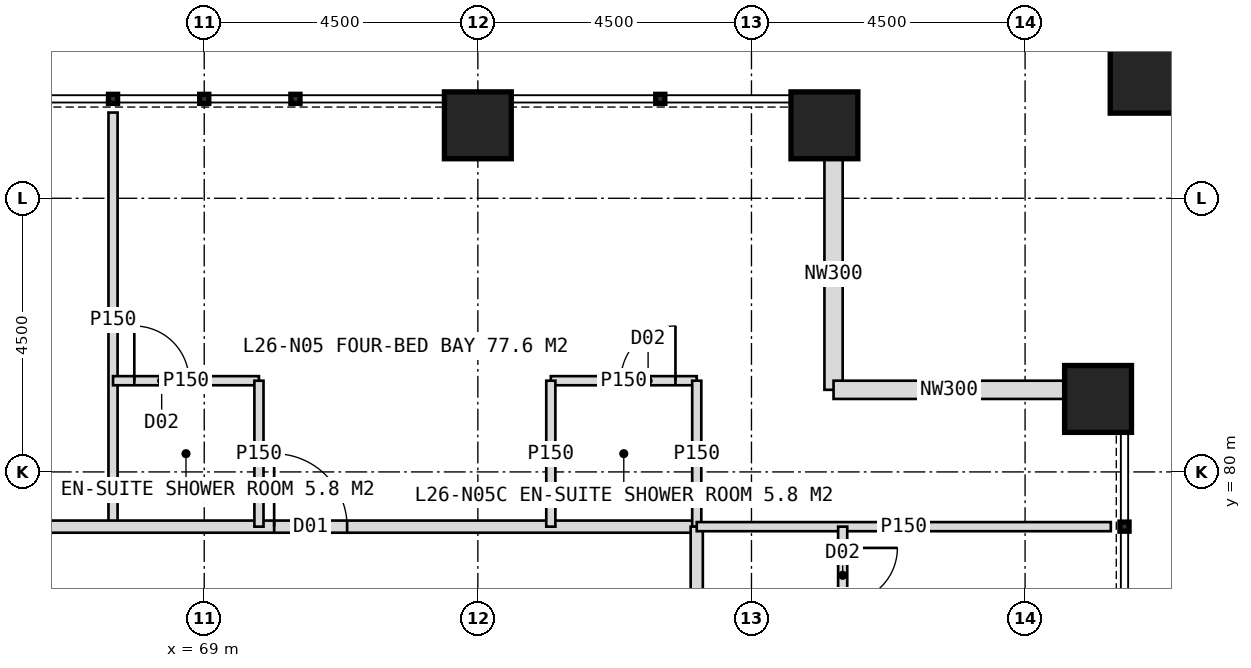
"""IFC4 building model, lengths in metres.
Left out: names, types, materials, properties, quantities, classifications, styles, units other than length and angle.
Written with IfcOpenShell. Run it as: python <this file> out.ifc"""

import sys

from ifc_helpers import new_model, si_unit, direction, frame, frame_2d, origin, origin_2d, place, context, subcontext, project, spatial, rectangle, hollow_rectangle, extrude, element, fill, save


model = new_model("IFC4")
c1 = context("Model", 3, precision=1e-05, world=origin(), true_north=direction((0.0, 1.0)))
c2 = subcontext(c1, "Body", "Model", "MODEL_VIEW")
j1 = project(units=[si_unit("LENGTHUNIT", "METRE"), si_unit("PLANEANGLEUNIT", "RADIAN")], contexts=[c1])
p1 = place(None, origin())
s1 = spatial("IfcSite", under=j1, at=p1, CompositionType="ELEMENT")
p2 = place(p1, origin())
s2 = spatial("IfcBuilding", under=s1, at=p2, CompositionType="ELEMENT")
p3 = place(p2, frame((0.0, 0.0, 112.0)))
s3 = spatial("IfcBuildingStorey", under=s2, at=p3, CompositionType="ELEMENT", Elevation=112.0)
for number, where, z_axis, x_axis in (
    (1, (73.5, 85.7, 0.0), (0.0, 0.0, 1.0), (1.0, 0.0, 0.0)),
    (2, (79.2, 85.7, 0.0), (0.0, 0.0, 1.0), (1.0, 0.0, 0.0)),
    (3, (83.7, 81.2, 0.0), (0.0, 0.0, 1.0), (1.0, 0.0, 0.0)),
):
    element("IfcColumn", number, at=place(p3, frame(where, z_axis=z_axis, x_axis=x_axis)), inside=s3, PredefinedType="COLUMN", context=c2, shape_type="SweptSolid", body=[
        extrude(hollow_rectangle(XDim=1.1, YDim=1.1, WallThickness=0.1, at=origin_2d()), origin(), (0.0, 0.0, 1.0), 4.0),
    ])
p4 = place(p3, frame((84.6, 86.6, 0.0), z_axis=(0.0, 0.0, 1.0), x_axis=(1.0, 0.0, 0.0)))
e4 = element("IfcColumn", 4, at=p4, inside=s3, PredefinedType="COLUMN", context=c2, shape_type="SweptSolid", body=[
    extrude(hollow_rectangle(XDim=1.4, YDim=1.4, WallThickness=0.08, at=origin_2d()), origin(), (0.0, 0.0, 1.0), 4.0),
])
for number, where, z_axis, x_axis in (
    (5, (79.35, 85.15, 0.0), (0.0, 0.0, 1.0), (0.0, -1.0, 0.0)),
    (6, (79.35, 81.35, 0.0), (0.0, 0.0, 1.0), (1.0, 0.0, 0.0)),
):
    element("IfcWall", number, at=place(p3, frame(where, z_axis=z_axis, x_axis=x_axis)), inside=s3, PredefinedType="ELEMENTEDWALL", context=c2, shape_type="SweptSolid", body=[
        extrude(rectangle(XDim=3.8, YDim=0.3, at=frame_2d((1.9, 0.0))), origin(), (0.0, 0.0, 1.0), 4.0),
    ])
p5 = place(p3, frame((67.5, 79.1, 0.0), z_axis=(0.0, 0.0, 1.0), x_axis=(0.0, 1.0, 0.0)))
e7 = element("IfcWall", 7, at=p5, inside=s3, PredefinedType="PARTITIONING", context=c2, shape_type="SweptSolid", body=[
    extrude(rectangle(XDim=6.81, YDim=0.15, at=frame_2d((3.405, 0.0))), origin(), (0.0, 0.0, 1.0), 3.75),
])
p6 = place(p3, frame((42.9, 79.1, 0.0), z_axis=(0.0, 0.0, 1.0), x_axis=(1.0, 0.0, 0.0)))
e8 = element("IfcWall", 8, at=p6, inside=s3, PredefinedType="PARTITIONING", context=c2, shape_type="SweptSolid", body=[
    extrude(rectangle(XDim=34.2, YDim=0.2, at=frame_2d((17.1, 0.0))), origin(), (0.0, 0.0, 1.0), 3.75),
])
p7 = place(p6, frame((3.25, 0.0, 0.0)))
e9 = element("IfcOpeningElement", 9, at=p7, cuts=e8, PredefinedType="OPENING", context=c2, shape_type="SweptSolid", body=[
    extrude(rectangle(XDim=1.2, YDim=2.2, at=frame_2d((0.6, 1.1))), frame((0.0, 0.11, 0.0), z_axis=(0.0, -1.0, 0.0), x_axis=(1.0, 0.0, 0.0)), (0.0, 0.0, 1.0), 0.22),
])
p8 = place(p6, frame((9.25, 0.0, 0.0)))
e10 = element("IfcOpeningElement", 10, at=p8, cuts=e8, PredefinedType="OPENING", context=c2, shape_type="SweptSolid", body=[
    extrude(rectangle(XDim=1.2, YDim=2.2, at=frame_2d((0.6, 1.1))), frame((0.0, 0.11, 0.0), z_axis=(0.0, -1.0, 0.0), x_axis=(1.0, 0.0, 0.0)), (0.0, 0.0, 1.0), 0.22),
])
p9 = place(p6, frame((13.75, 0.0, 0.0)))
e11 = element("IfcOpeningElement", 11, at=p9, cuts=e8, PredefinedType="OPENING", context=c2, shape_type="SweptSolid", body=[
    extrude(rectangle(XDim=1.2, YDim=2.2, at=frame_2d((0.6, 1.1))), frame((0.0, 0.11, 0.0), z_axis=(0.0, -1.0, 0.0), x_axis=(1.0, 0.0, 0.0)), (0.0, 0.0, 1.0), 0.22),
])
p10 = place(p6, frame((19.6, 0.0, 0.0)))
e12 = element("IfcOpeningElement", 12, at=p10, cuts=e8, PredefinedType="OPENING", context=c2, shape_type="SweptSolid", body=[
    extrude(rectangle(XDim=1.0, YDim=2.1, at=frame_2d((0.5, 1.05))), frame((0.0, 0.11, 0.0), z_axis=(0.0, -1.0, 0.0), x_axis=(1.0, 0.0, 0.0)), (0.0, 0.0, 1.0), 0.22),
])
p11 = place(p6, frame((27.25, 0.0, 0.0)))
e13 = element("IfcOpeningElement", 13, at=p11, cuts=e8, PredefinedType="OPENING", context=c2, shape_type="SweptSolid", body=[
    extrude(rectangle(XDim=1.2, YDim=2.2, at=frame_2d((0.6, 1.1))), frame((0.0, 0.11, 0.0), z_axis=(0.0, -1.0, 0.0), x_axis=(1.0, 0.0, 0.0)), (0.0, 0.0, 1.0), 0.22),
])
p12 = place(p3, frame((67.5, 81.5, 0.0), z_axis=(0.0, 0.0, 1.0), x_axis=(1.0, 0.0, 0.0)))
e14 = element("IfcWall", 14, at=p12, inside=s3, PredefinedType="PARTITIONING", context=c2, shape_type="SweptSolid", body=[
    extrude(rectangle(XDim=2.4, YDim=0.15, at=frame_2d((1.2, 0.0))), origin(), (0.0, 0.0, 1.0), 3.75),
])
p13 = place(p12, frame((0.35, 0.0, 0.0)))
e15 = element("IfcOpeningElement", 15, at=p13, cuts=e14, PredefinedType="OPENING", context=c2, shape_type="SweptSolid", body=[
    extrude(rectangle(XDim=0.9, YDim=2.1, at=frame_2d((0.45, 1.05))), frame((0.0, 0.085, 0.0), z_axis=(0.0, -1.0, 0.0), x_axis=(1.0, 0.0, 0.0)), (0.0, 0.0, 1.0), 0.17),
])
p14 = place(p3, frame((69.9, 79.1, 0.0), z_axis=(0.0, 0.0, 1.0), x_axis=(0.0, 1.0, 0.0)))
e16 = element("IfcWall", 16, at=p14, inside=s3, PredefinedType="PARTITIONING", context=c2, shape_type="SweptSolid", body=[
    extrude(rectangle(XDim=2.4, YDim=0.15, at=frame_2d((1.2, 0.0))), origin(), (0.0, 0.0, 1.0), 3.75),
])
p15 = place(p3, frame((74.7, 81.5, 0.0), z_axis=(0.0, 0.0, 1.0), x_axis=(1.0, 0.0, 0.0)))
e17 = element("IfcWall", 17, at=p15, inside=s3, PredefinedType="PARTITIONING", context=c2, shape_type="SweptSolid", body=[
    extrude(rectangle(XDim=2.4, YDim=0.15, at=frame_2d((1.2, 0.0))), origin(), (0.0, 0.0, 1.0), 3.75),
])
p16 = place(p15, frame((1.15, 0.0, 0.0)))
e18 = element("IfcOpeningElement", 18, at=p16, cuts=e17, PredefinedType="OPENING", context=c2, shape_type="SweptSolid", body=[
    extrude(rectangle(XDim=0.9, YDim=2.1, at=frame_2d((0.45, 1.05))), frame((0.0, 0.085, 0.0), z_axis=(0.0, -1.0, 0.0), x_axis=(1.0, 0.0, 0.0)), (0.0, 0.0, 1.0), 0.17),
])
for number, where, z_axis, x_axis in (
    (19, (74.7, 79.1, 0.0), (0.0, 0.0, 1.0), (0.0, 1.0, 0.0)),
    (20, (77.1, 79.1, 0.0), (0.0, 0.0, 1.0), (0.0, 1.0, 0.0)),
):
    element("IfcWall", number, at=place(p3, frame(where, z_axis=z_axis, x_axis=x_axis)), inside=s3, PredefinedType="PARTITIONING", context=c2, shape_type="SweptSolid", body=[
        extrude(rectangle(XDim=2.4, YDim=0.15, at=frame_2d((1.2, 0.0))), origin(), (0.0, 0.0, 1.0), 3.75),
    ])
p17 = place(p3, frame((77.1, 79.1, 0.0), z_axis=(0.0, 0.0, 1.0), x_axis=(0.0, -1.0, 0.0)))
e21 = element("IfcWall", 21, at=p17, inside=s3, PredefinedType="PARTITIONING", context=c2, shape_type="SweptSolid", body=[
    extrude(rectangle(XDim=34.2, YDim=0.2, at=frame_2d((17.1, 0.0))), origin(), (0.0, 0.0, 1.0), 3.75),
])
p18 = place(p17, frame((2.65, 0.0, 0.0)))
e22 = element("IfcOpeningElement", 22, at=p18, cuts=e21, PredefinedType="OPENING", context=c2, shape_type="SweptSolid", body=[
    extrude(rectangle(XDim=1.2, YDim=2.2, at=frame_2d((0.6, 1.1))), frame((0.0, 0.11, 0.0), z_axis=(0.0, -1.0, 0.0), x_axis=(1.0, 0.0, 0.0)), (0.0, 0.0, 1.0), 0.22),
])
p19 = place(p17, frame((10.75, 0.0, 0.0)))
e23 = element("IfcOpeningElement", 23, at=p19, cuts=e21, PredefinedType="OPENING", context=c2, shape_type="SweptSolid", body=[
    extrude(rectangle(XDim=1.2, YDim=2.2, at=frame_2d((0.6, 1.1))), frame((0.0, 0.11, 0.0), z_axis=(0.0, -1.0, 0.0), x_axis=(1.0, 0.0, 0.0)), (0.0, 0.0, 1.0), 0.22),
])
p20 = place(p17, frame((19.75, 0.0, 0.0)))
e24 = element("IfcOpeningElement", 24, at=p20, cuts=e21, PredefinedType="OPENING", context=c2, shape_type="SweptSolid", body=[
    extrude(rectangle(XDim=1.2, YDim=2.2, at=frame_2d((0.6, 1.1))), frame((0.0, 0.11, 0.0), z_axis=(0.0, -1.0, 0.0), x_axis=(1.0, 0.0, 0.0)), (0.0, 0.0, 1.0), 0.22),
])
p21 = place(p17, frame((25.75, 0.0, 0.0)))
e25 = element("IfcOpeningElement", 25, at=p21, cuts=e21, PredefinedType="OPENING", context=c2, shape_type="SweptSolid", body=[
    extrude(rectangle(XDim=1.2, YDim=2.2, at=frame_2d((0.6, 1.1))), frame((0.0, 0.11, 0.0), z_axis=(0.0, -1.0, 0.0), x_axis=(1.0, 0.0, 0.0)), (0.0, 0.0, 1.0), 0.22),
])
p22 = place(p17, frame((30.25, 0.0, 0.0)))
e26 = element("IfcOpeningElement", 26, at=p22, cuts=e21, PredefinedType="OPENING", context=c2, shape_type="SweptSolid", body=[
    extrude(rectangle(XDim=1.2, YDim=2.2, at=frame_2d((0.6, 1.1))), frame((0.0, 0.11, 0.0), z_axis=(0.0, -1.0, 0.0), x_axis=(1.0, 0.0, 0.0)), (0.0, 0.0, 1.0), 0.22),
])
p23 = place(p3, frame((77.1, 79.1, 0.0), z_axis=(0.0, 0.0, 1.0), x_axis=(1.0, 0.0, 0.0)))
e27 = element("IfcWall", 27, at=p23, inside=s3, PredefinedType="PARTITIONING", context=c2, shape_type="SweptSolid", body=[
    extrude(rectangle(XDim=6.81, YDim=0.15, at=frame_2d((3.405, 0.0))), origin(), (0.0, 0.0, 1.0), 3.75),
])
p24 = place(p3, frame((79.5, 79.1, 0.0), z_axis=(0.0, 0.0, 1.0), x_axis=(0.0, -1.0, 0.0)))
e28 = element("IfcWall", 28, at=p24, inside=s3, PredefinedType="PARTITIONING", context=c2, shape_type="SweptSolid", body=[
    extrude(rectangle(XDim=2.4, YDim=0.15, at=frame_2d((1.2, 0.0))), origin(), (0.0, 0.0, 1.0), 3.75),
])
p25 = place(p24, frame((0.35, 0.0, 0.0)))
e29 = element("IfcOpeningElement", 29, at=p25, cuts=e28, PredefinedType="OPENING", context=c2, shape_type="SweptSolid", body=[
    extrude(rectangle(XDim=0.9, YDim=2.1, at=frame_2d((0.45, 1.05))), frame((0.0, 0.085, 0.0), z_axis=(0.0, -1.0, 0.0), x_axis=(1.0, 0.0, 0.0)), (0.0, 0.0, 1.0), 0.17),
])
p26 = place(p11, origin())
e30 = element("IfcDoor", 30, at=p26, inside=s3, OperationType="SINGLE_SWING_LEFT", PredefinedType="DOOR", context=c2, shape_type="SweptSolid", body=[
    extrude(rectangle(XDim=1.2, YDim=2.2, at=frame_2d((0.6, 1.1))), frame((0.0, 0.025, 0.0), z_axis=(0.0, -1.0, 0.0), x_axis=(1.0, 0.0, 0.0)), (0.0, 0.0, 1.0), 0.05),
])
fill(e13, e30)
p27 = place(p13, origin())
e31 = element("IfcDoor", 31, at=p27, inside=s3, OperationType="SINGLE_SWING_LEFT", PredefinedType="DOOR", context=c2, shape_type="SweptSolid", body=[
    extrude(rectangle(XDim=0.9, YDim=2.1, at=frame_2d((0.45, 1.05))), frame((0.0, 0.025, 0.0), z_axis=(0.0, -1.0, 0.0), x_axis=(1.0, 0.0, 0.0)), (0.0, 0.0, 1.0), 0.05),
])
fill(e15, e31)
p28 = place(p16, origin())
e32 = element("IfcDoor", 32, at=p28, inside=s3, OperationType="SINGLE_SWING_RIGHT", PredefinedType="DOOR", context=c2, shape_type="SweptSolid", body=[
    extrude(rectangle(XDim=0.9, YDim=2.1, at=frame_2d((0.45, 1.05))), frame((0.0, 0.025, 0.0), z_axis=(0.0, -1.0, 0.0), x_axis=(1.0, 0.0, 0.0)), (0.0, 0.0, 1.0), 0.05),
])
fill(e18, e32)
p29 = place(p25, origin())
e33 = element("IfcDoor", 33, at=p29, inside=s3, OperationType="SINGLE_SWING_LEFT", PredefinedType="DOOR", context=c2, shape_type="SweptSolid", body=[
    extrude(rectangle(XDim=0.9, YDim=2.1, at=frame_2d((0.45, 1.05))), frame((0.0, 0.025, 0.0), z_axis=(0.0, -1.0, 0.0), x_axis=(1.0, 0.0, 0.0)), (0.0, 0.0, 1.0), 0.05),
])
fill(e29, e33)
save(model, sys.argv[1])
